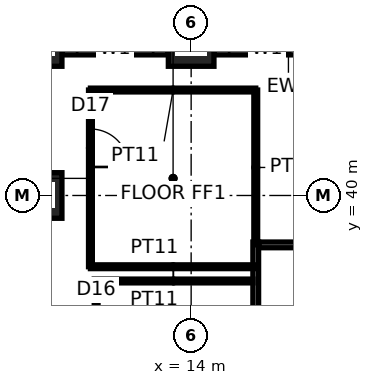
"""IFC4 building model, lengths in metres.
Left out: names, types, materials, properties, quantities, classifications, styles, units other than length and angle.
Written with IfcOpenShell. Run it as: python <this file> out.ifc"""

import sys

from ifc_helpers import new_model, si_unit, direction, frame, frame_2d, origin, origin_2d, place, context, subcontext, project, spatial, rectangle, hollow_rectangle, extrude, element, fill, save


model = new_model("IFC4")
c1 = context("Model", 3, precision=1e-05, world=origin(), true_north=direction((0.0, 1.0)))
c2 = subcontext(c1, "Body", "Model", "MODEL_VIEW")
j1 = project(units=[si_unit("LENGTHUNIT", "METRE"), si_unit("PLANEANGLEUNIT", "RADIAN")], contexts=[c1])
p1 = place(None, origin())
s1 = spatial("IfcSite", under=j1, at=p1, CompositionType="ELEMENT")
p2 = place(p1, origin())
s2 = spatial("IfcBuilding", under=s1, at=p2, CompositionType="ELEMENT")
p3 = place(p2, frame((0.0, 0.0, 15.0)))
s3 = spatial("IfcBuildingStorey", under=s2, at=p3, CompositionType="ELEMENT", Elevation=15.0)
for number, where, z_axis, x_axis in (
    (1, (10.0, 44.0, 0.0), (0.0, 0.0, 1.0), (1.0, 0.0, 0.0)),
    (2, (14.0, 44.0, 0.0), (0.0, 0.0, 1.0), (1.0, 0.0, 0.0)),
    (3, (10.0, 40.0, 0.0), (0.0, 0.0, 1.0), (1.0, 0.0, 0.0)),
):
    element("IfcColumn", number, at=place(p3, frame(where, z_axis=z_axis, x_axis=x_axis)), inside=s3, PredefinedType="COLUMN", context=c2, shape_type="SweptSolid", body=[
        extrude(hollow_rectangle(XDim=1.2, YDim=1.2, WallThickness=0.1, at=origin_2d()), origin(), (0.0, 0.0, 1.0), 4.0),
    ])
p4 = place(p3, frame((15.7, 15.225, 0.0), z_axis=(0.0, 0.0, 1.0), x_axis=(0.0, 1.0, 0.0)))
e4 = element("IfcWall", 4, at=p4, inside=s3, PredefinedType="PARTITIONING", context=c2, shape_type="SweptSolid", body=[
    extrude(rectangle(XDim=23.55, YDim=0.15, at=frame_2d((11.775, 0.0))), origin(), (0.0, 0.0, 1.0), 3.85),
])
p5 = place(p4, frame((5.175, 0.0, 0.0)))
e5 = element("IfcOpeningElement", 5, at=p5, cuts=e4, PredefinedType="OPENING", context=c2, shape_type="SweptSolid", body=[
    extrude(rectangle(XDim=1.8, YDim=2.4, at=frame_2d((0.9, 1.2))), frame((0.0, 0.085, 0.0), z_axis=(0.0, -1.0, 0.0), x_axis=(1.0, 0.0, 0.0)), (0.0, 0.0, 1.0), 0.17),
])
p6 = place(p4, frame((16.825, 0.0, 0.0)))
e6 = element("IfcOpeningElement", 6, at=p6, cuts=e4, PredefinedType="OPENING", context=c2, shape_type="SweptSolid", body=[
    extrude(rectangle(XDim=1.8, YDim=2.4, at=frame_2d((0.9, 1.2))), frame((0.0, 0.085, 0.0), z_axis=(0.0, -1.0, 0.0), x_axis=(1.0, 0.0, 0.0)), (0.0, 0.0, 1.0), 0.17),
])
p7 = place(p3, frame((15.775, 38.7, 0.0), z_axis=(0.0, 0.0, 1.0), x_axis=(1.0, 0.0, 0.0)))
e7 = element("IfcWall", 7, at=p7, inside=s3, PredefinedType="PARTITIONING", context=c2, shape_type="SweptSolid", body=[
    extrude(rectangle(XDim=28.45, YDim=0.15, at=frame_2d((14.225, 0.0))), origin(), (0.0, 0.0, 1.0), 3.85),
])
p8 = place(p7, frame((7.975, 0.0, 0.0)))
e8 = element("IfcOpeningElement", 8, at=p8, cuts=e7, PredefinedType="OPENING", context=c2, shape_type="SweptSolid", body=[
    extrude(rectangle(XDim=0.9, YDim=2.1, at=frame_2d((0.45, 1.05))), frame((0.0, 0.085, 0.0), z_axis=(0.0, -1.0, 0.0), x_axis=(1.0, 0.0, 0.0)), (0.0, 0.0, 1.0), 0.17),
])
p9 = place(p7, frame((11.725, 0.0, 0.0)))
e9 = element("IfcOpeningElement", 9, at=p9, cuts=e7, PredefinedType="OPENING", context=c2, shape_type="SweptSolid", body=[
    extrude(rectangle(XDim=1.0, YDim=2.1, at=frame_2d((0.5, 1.05))), frame((0.0, 0.085, 0.0), z_axis=(0.0, -1.0, 0.0), x_axis=(1.0, 0.0, 0.0)), (0.0, 0.0, 1.0), 0.17),
])
p10 = place(p7, frame((15.575, 0.0, 0.0)))
e10 = element("IfcOpeningElement", 10, at=p10, cuts=e7, PredefinedType="OPENING", context=c2, shape_type="SweptSolid", body=[
    extrude(rectangle(XDim=0.9, YDim=2.1, at=frame_2d((0.45, 1.05))), frame((0.0, 0.085, 0.0), z_axis=(0.0, -1.0, 0.0), x_axis=(1.0, 0.0, 0.0)), (0.0, 0.0, 1.0), 0.17),
])
p11 = place(p3, frame((11.45, 37.75, 0.0), z_axis=(0.0, 0.0, 1.0), x_axis=(1.0, 0.0, 0.0)))
e11 = element("IfcWall", 11, at=p11, inside=s3, PredefinedType="PARTITIONING", context=c2, shape_type="SweptSolid", body=[
    extrude(rectangle(XDim=4.175, YDim=0.1, at=frame_2d((2.087, 0.0))), origin(), (0.0, 0.0, 1.0), 3.85),
])
p12 = place(p3, frame((11.5, 35.15, 0.0), z_axis=(0.0, 0.0, 1.0), x_axis=(0.0, 1.0, 0.0)))
e12 = element("IfcWall", 12, at=p12, inside=s3, PredefinedType="PARTITIONING", context=c2, shape_type="SweptSolid", body=[
    extrude(rectangle(XDim=2.55, YDim=0.1, at=frame_2d((1.275, 0.0))), origin(), (0.0, 0.0, 1.0), 3.85),
])
p13 = place(p12, frame((0.775, 0.0, 0.0)))
e13 = element("IfcOpeningElement", 13, at=p13, cuts=e12, PredefinedType="OPENING", context=c2, shape_type="SweptSolid", body=[
    extrude(rectangle(XDim=1.0, YDim=2.2, at=frame_2d((0.5, 1.1))), frame((0.0, 0.06, 0.0), z_axis=(0.0, -1.0, 0.0), x_axis=(1.0, 0.0, 0.0)), (0.0, 0.0, 1.0), 0.12),
])
p14 = place(p3, frame((15.7, 38.7, 0.0), z_axis=(0.0, 0.0, 1.0), x_axis=(0.0, 1.0, 0.0)))
e14 = element("IfcWall", 14, at=p14, inside=s3, PredefinedType="PARTITIONING", context=c2, shape_type="SweptSolid", body=[
    extrude(rectangle(XDim=4.075, YDim=0.1, at=frame_2d((2.038, 0.0))), origin(), (0.0, 0.0, 1.0), 3.85),
])
p15 = place(p3, frame((15.7, 42.775, 0.0), z_axis=(0.0, 0.0, 1.0), x_axis=(-1.0, 0.0, 0.0)))
e15 = element("IfcWall", 15, at=p15, inside=s3, PredefinedType="PARTITIONING", context=c2, shape_type="SweptSolid", body=[
    extrude(rectangle(XDim=4.35, YDim=0.1, at=frame_2d((2.175, 0.0))), origin(), (0.0, 0.0, 1.0), 3.85),
])
p16 = place(p3, frame((11.35, 42.775, 0.0), z_axis=(0.0, 0.0, 1.0), x_axis=(0.0, -1.0, 0.0)))
e16 = element("IfcWall", 16, at=p16, inside=s3, PredefinedType="PARTITIONING", context=c2, shape_type="SweptSolid", body=[
    extrude(rectangle(XDim=4.65, YDim=0.1, at=frame_2d((2.325, 0.0))), origin(), (0.0, 0.0, 1.0), 3.85),
])
p17 = place(p16, frame((1.025, 0.0, 0.0)))
e17 = element("IfcOpeningElement", 17, at=p17, cuts=e16, PredefinedType="OPENING", context=c2, shape_type="SweptSolid", body=[
    extrude(rectangle(XDim=1.0, YDim=2.2, at=frame_2d((0.5, 1.1))), frame((0.0, 0.06, 0.0), z_axis=(0.0, -1.0, 0.0), x_axis=(1.0, 0.0, 0.0)), (0.0, 0.0, 1.0), 0.12),
])
p18 = place(p3, frame((11.35, 38.125, 0.0), z_axis=(0.0, 0.0, 1.0), x_axis=(1.0, 0.0, 0.0)))
e18 = element("IfcWall", 18, at=p18, inside=s3, PredefinedType="PARTITIONING", context=c2, shape_type="SweptSolid", body=[
    extrude(rectangle(XDim=4.35, YDim=0.1, at=frame_2d((2.175, 0.0))), origin(), (0.0, 0.0, 1.0), 3.85),
])
p19 = place(p3, frame((13.4, 43.85, 0.0), z_axis=(0.0, 0.0, 1.0), x_axis=(-1.0, 0.0, 0.0)))
e19 = element("IfcWall", 19, at=p19, inside=s3, PredefinedType="ELEMENTEDWALL", context=c2, shape_type="SweptSolid", body=[
    extrude(rectangle(XDim=2.8, YDim=0.3, at=frame_2d((1.4, 0.0))), origin(), (0.0, 0.0, 1.0), 2.85),
])
p20 = place(p19, frame((0.4, 0.0, 0.8)))
e20 = element("IfcOpeningElement", 20, at=p20, cuts=e19, PredefinedType="OPENING", context=c2, shape_type="SweptSolid", body=[
    extrude(rectangle(XDim=2.0, YDim=2.0, at=frame_2d((1.0, 1.0))), frame((0.0, 0.16, 0.0), z_axis=(0.0, -1.0, 0.0), x_axis=(1.0, 0.0, 0.0)), (0.0, 0.0, 1.0), 0.32),
])
p21 = place(p3, frame((17.4, 43.85, 0.0), z_axis=(0.0, 0.0, 1.0), x_axis=(-1.0, 0.0, 0.0)))
e21 = element("IfcWall", 21, at=p21, inside=s3, PredefinedType="ELEMENTEDWALL", context=c2, shape_type="SweptSolid", body=[
    extrude(rectangle(XDim=2.8, YDim=0.3, at=frame_2d((1.4, 0.0))), origin(), (0.0, 0.0, 1.0), 2.85),
])
p22 = place(p21, frame((0.4, 0.0, 0.8)))
e22 = element("IfcOpeningElement", 22, at=p22, cuts=e21, PredefinedType="OPENING", context=c2, shape_type="SweptSolid", body=[
    extrude(rectangle(XDim=2.0, YDim=2.0, at=frame_2d((1.0, 1.0))), frame((0.0, 0.16, 0.0), z_axis=(0.0, -1.0, 0.0), x_axis=(1.0, 0.0, 0.0)), (0.0, 0.0, 1.0), 0.32),
])
p23 = place(p17, origin())
e23 = element("IfcDoor", 23, at=p23, inside=s3, OperationType="SINGLE_SWING_RIGHT", PredefinedType="DOOR", context=c2, shape_type="SweptSolid", body=[
    extrude(rectangle(XDim=1.0, YDim=2.2, at=frame_2d((0.5, 1.1))), frame((0.0, 0.025, 0.0), z_axis=(0.0, -1.0, 0.0), x_axis=(1.0, 0.0, 0.0)), (0.0, 0.0, 1.0), 0.05),
])
fill(e17, e23)
save(model, sys.argv[1])
